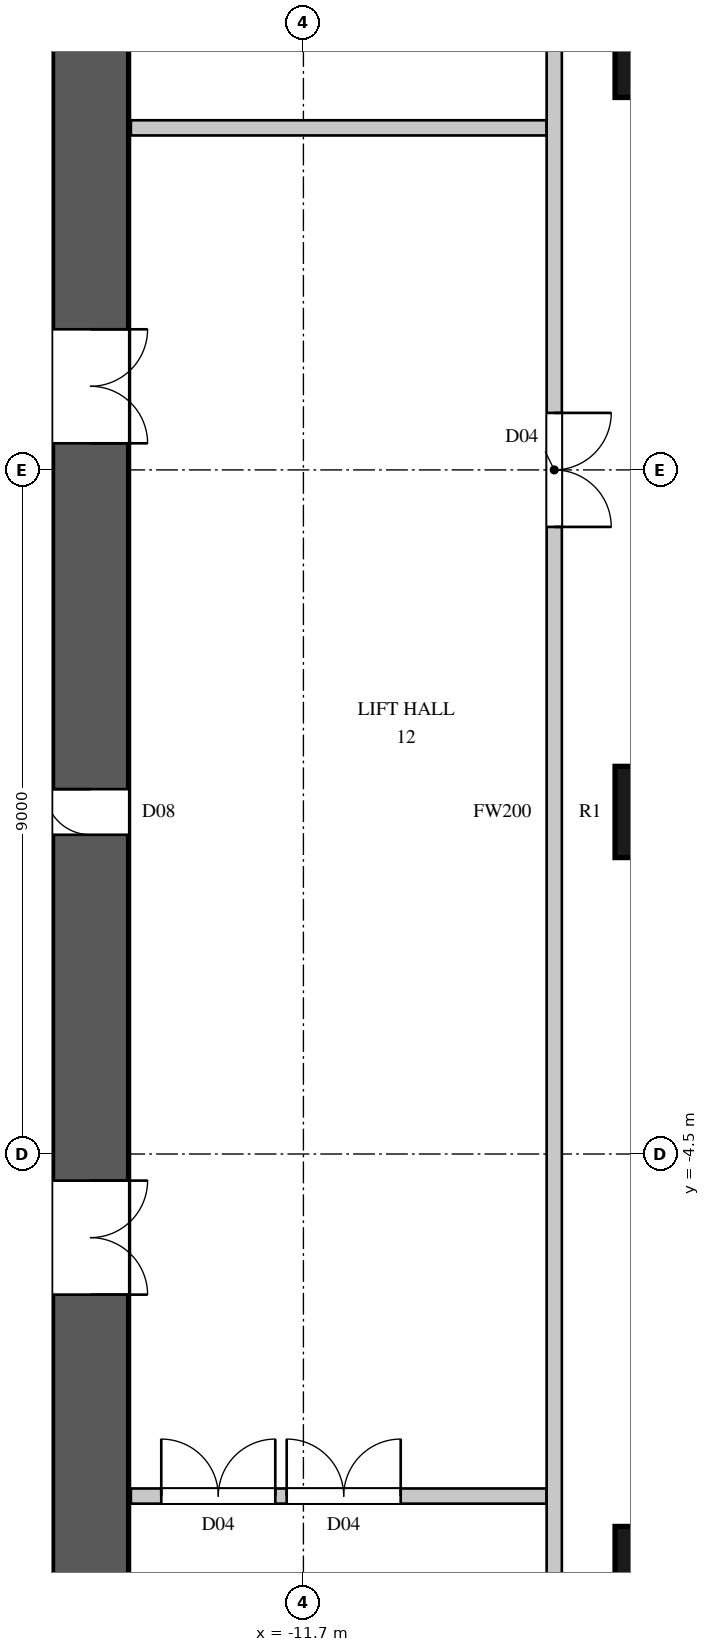
"""IFC4 building model, lengths in metres.
Left out: names, types, materials, properties, quantities, classifications, styles, units other than length and angle.
Written with IfcOpenShell. Run it as: python <this file> out.ifc"""

import sys

from ifc_helpers import new_model, si_unit, direction, frame, frame_2d, origin, origin_2d, place, context, subcontext, project, spatial, rectangle, circle, extrude, element, fill, save


model = new_model("IFC4")
c1 = context("Model", 3, precision=1e-05, world=origin(), true_north=direction((0.0, 1.0)))
c2 = subcontext(c1, "Body", "Model", "MODEL_VIEW")
j1 = project(units=[si_unit("LENGTHUNIT", "METRE"), si_unit("PLANEANGLEUNIT", "RADIAN")], contexts=[c1])
p1 = place(None, origin())
s1 = spatial("IfcSite", under=j1, at=p1, CompositionType="ELEMENT")
p2 = place(p1, origin())
s2 = spatial("IfcBuilding", under=s1, at=p2, CompositionType="ELEMENT")
p3 = place(p2, frame((0.0, 0.0, 73.5)))
s3 = spatial("IfcBuildingStorey", under=s2, at=p3, CompositionType="ELEMENT", Elevation=73.5)
for number, where, z_axis, x_axis in (
    (1, (-7.0, -10.0, 0.0), (0.0, 0.0, 1.0), (1.0, 0.0, 0.0)),
    (2, (-7.0, 0.0, 0.0), (0.0, 0.0, 1.0), (1.0, 0.0, 0.0)),
    (3, (-7.0, 10.0, 0.0), (0.0, 0.0, 1.0), (1.0, 0.0, 0.0)),
):
    element("IfcColumn", number, at=place(p3, frame(where, z_axis=z_axis, x_axis=x_axis)), inside=s3, PredefinedType="COLUMN", context=c2, shape_type="SweptSolid", body=[
        extrude(circle(Radius=0.6, at=origin_2d()), origin(), (0.0, 0.0, 1.0), 3.6),
    ])
p4 = place(p3, frame((-14.5, -14.8, 0.0), z_axis=(0.0, 0.0, 1.0), x_axis=(0.0, 1.0, 0.0)))
e4 = element("IfcWall", 4, at=p4, inside=s3, PredefinedType="SHEAR", context=c2, shape_type="SweptSolid", body=[
    extrude(rectangle(XDim=29.6, YDim=1.0, at=frame_2d((14.8, 0.0))), origin(), (0.0, 0.0, 1.0), 3.6),
])
p5 = place(p4, frame((8.45, 0.0, 0.0)))
e5 = element("IfcOpeningElement", 5, at=p5, cuts=e4, PredefinedType="OPENING", context=c2, shape_type="SweptSolid", body=[
    extrude(rectangle(XDim=1.5, YDim=2.4, at=frame_2d((0.75, 1.2))), frame((0.0, 0.51, 0.0), z_axis=(0.0, -1.0, 0.0), x_axis=(1.0, 0.0, 0.0)), (0.0, 0.0, 1.0), 1.02),
])
p6 = place(p4, frame((19.65, 0.0, 0.0)))
e6 = element("IfcOpeningElement", 6, at=p6, cuts=e4, PredefinedType="OPENING", context=c2, shape_type="SweptSolid", body=[
    extrude(rectangle(XDim=1.5, YDim=2.4, at=frame_2d((0.75, 1.2))), frame((0.0, 0.51, 0.0), z_axis=(0.0, -1.0, 0.0), x_axis=(1.0, 0.0, 0.0)), (0.0, 0.0, 1.0), 1.02),
])
p7 = place(p4, frame((14.5, 0.0, 0.0)))
e7 = element("IfcOpeningElement", 7, at=p7, cuts=e4, PredefinedType="OPENING", context=c2, shape_type="SweptSolid", body=[
    extrude(rectangle(XDim=0.6, YDim=2.0, at=frame_2d((0.3, 1.0))), frame((0.0, 0.51, 0.0), z_axis=(0.0, -1.0, 0.0), x_axis=(1.0, 0.0, 0.0)), (0.0, 0.0, 1.0), 1.02),
])
p8 = place(p3, frame((-13.97, -9.0, 0.0), z_axis=(0.0, 0.0, 1.0), x_axis=(1.0, 0.0, 0.0)))
e8 = element("IfcWall", 8, at=p8, inside=s3, PredefinedType="PARTITIONING", context=c2, shape_type="SweptSolid", body=[
    extrude(rectangle(XDim=5.47, YDim=0.2, at=frame_2d((2.735, 0.0))), origin(), (0.0, 0.0, 1.0), 3.3),
])
p9 = place(p8, frame((0.4, 0.0, 0.0)))
e9 = element("IfcOpeningElement", 9, at=p9, cuts=e8, PredefinedType="OPENING", context=c2, shape_type="SweptSolid", body=[
    extrude(rectangle(XDim=1.5, YDim=2.2, at=frame_2d((0.75, 1.1))), frame((0.0, 0.11, 0.0), z_axis=(0.0, -1.0, 0.0), x_axis=(1.0, 0.0, 0.0)), (0.0, 0.0, 1.0), 0.22),
])
p10 = place(p8, frame((2.05, 0.0, 0.0)))
e10 = element("IfcOpeningElement", 10, at=p10, cuts=e8, PredefinedType="OPENING", context=c2, shape_type="SweptSolid", body=[
    extrude(rectangle(XDim=1.5, YDim=2.2, at=frame_2d((0.75, 1.1))), frame((0.0, 0.11, 0.0), z_axis=(0.0, -1.0, 0.0), x_axis=(1.0, 0.0, 0.0)), (0.0, 0.0, 1.0), 0.22),
])
p11 = place(p3, frame((-13.97, 9.0, 0.0), z_axis=(0.0, 0.0, 1.0), x_axis=(1.0, 0.0, 0.0)))
e11 = element("IfcWall", 11, at=p11, inside=s3, PredefinedType="PARTITIONING", context=c2, shape_type="SweptSolid", body=[
    extrude(rectangle(XDim=5.47, YDim=0.2, at=frame_2d((2.735, 0.0))), origin(), (0.0, 0.0, 1.0), 3.3),
])
p12 = place(p3, frame((-8.4, -17.4, 0.0), z_axis=(0.0, 0.0, 1.0), x_axis=(0.0, 1.0, 0.0)))
e12 = element("IfcWall", 12, at=p12, inside=s3, PredefinedType="PARTITIONING", context=c2, shape_type="SweptSolid", body=[
    extrude(rectangle(XDim=34.8, YDim=0.2, at=frame_2d((17.4, 0.0))), origin(), (0.0, 0.0, 1.0), 3.3),
])
p13 = place(p12, frame((21.15, 0.0, 0.0)))
e13 = element("IfcOpeningElement", 13, at=p13, cuts=e12, PredefinedType="OPENING", context=c2, shape_type="SweptSolid", body=[
    extrude(rectangle(XDim=1.5, YDim=2.2, at=frame_2d((0.75, 1.1))), frame((0.0, 0.11, 0.0), z_axis=(0.0, -1.0, 0.0), x_axis=(1.0, 0.0, 0.0)), (0.0, 0.0, 1.0), 0.22),
])
p14 = place(p12, frame((33.75, 0.0, 0.0)))
e14 = element("IfcOpeningElement", 14, at=p14, cuts=e12, PredefinedType="OPENING", context=c2, shape_type="SweptSolid", body=[
    extrude(rectangle(XDim=0.9, YDim=2.2, at=frame_2d((0.45, 1.1))), frame((0.0, 0.11, 0.0), z_axis=(0.0, -1.0, 0.0), x_axis=(1.0, 0.0, 0.0)), (0.0, 0.0, 1.0), 0.22),
])
p15 = place(p12, frame((0.15, 0.0, 0.0)))
e15 = element("IfcOpeningElement", 15, at=p15, cuts=e12, PredefinedType="OPENING", context=c2, shape_type="SweptSolid", body=[
    extrude(rectangle(XDim=0.95, YDim=2.2, at=frame_2d((0.475, 1.1))), frame((0.0, 0.11, 0.0), z_axis=(0.0, -1.0, 0.0), x_axis=(1.0, 0.0, 0.0)), (0.0, 0.0, 1.0), 0.22),
])
p16 = place(p13, origin())
e16 = element("IfcDoor", 16, at=p16, inside=s3, OperationType="DOUBLE_DOOR_SINGLE_SWING", PredefinedType="DOOR", context=c2, shape_type="SweptSolid", body=[
    extrude(rectangle(XDim=1.5, YDim=2.2, at=frame_2d((0.75, 1.1))), frame((0.0, 0.025, 0.0), z_axis=(0.0, -1.0, 0.0), x_axis=(1.0, 0.0, 0.0)), (0.0, 0.0, 1.0), 0.05),
])
fill(e13, e16)
p17 = place(p9, origin())
e17 = element("IfcDoor", 17, at=p17, inside=s3, OperationType="DOUBLE_DOOR_SINGLE_SWING", PredefinedType="DOOR", context=c2, shape_type="SweptSolid", body=[
    extrude(rectangle(XDim=1.5, YDim=2.2, at=frame_2d((0.75, 1.1))), frame((0.0, 0.025, 0.0), z_axis=(0.0, -1.0, 0.0), x_axis=(1.0, 0.0, 0.0)), (0.0, 0.0, 1.0), 0.05),
])
fill(e9, e17)
p18 = place(p10, origin())
e18 = element("IfcDoor", 18, at=p18, inside=s3, OperationType="DOUBLE_DOOR_SINGLE_SWING", PredefinedType="DOOR", context=c2, shape_type="SweptSolid", body=[
    extrude(rectangle(XDim=1.5, YDim=2.2, at=frame_2d((0.75, 1.1))), frame((0.0, 0.025, 0.0), z_axis=(0.0, -1.0, 0.0), x_axis=(1.0, 0.0, 0.0)), (0.0, 0.0, 1.0), 0.05),
])
fill(e10, e18)
p19 = place(p5, origin())
e19 = element("IfcDoor", 19, at=p19, inside=s3, OperationType="DOUBLE_DOOR_SINGLE_SWING", PredefinedType="DOOR", context=c2, shape_type="SweptSolid", body=[
    extrude(rectangle(XDim=1.5, YDim=2.4, at=frame_2d((0.75, 1.2))), frame((0.0, -0.445, 0.0), z_axis=(0.0, -1.0, 0.0), x_axis=(1.0, 0.0, 0.0)), (0.0, 0.0, 1.0), 0.05),
])
fill(e5, e19)
p20 = place(p6, origin())
e20 = element("IfcDoor", 20, at=p20, inside=s3, OperationType="DOUBLE_DOOR_SINGLE_SWING", PredefinedType="DOOR", context=c2, shape_type="SweptSolid", body=[
    extrude(rectangle(XDim=1.5, YDim=2.4, at=frame_2d((0.75, 1.2))), frame((0.0, -0.445, 0.0), z_axis=(0.0, -1.0, 0.0), x_axis=(1.0, 0.0, 0.0)), (0.0, 0.0, 1.0), 0.05),
])
fill(e6, e20)
p21 = place(p7, origin())
e21 = element("IfcDoor", 21, at=p21, inside=s3, OperationType="SINGLE_SWING_RIGHT", PredefinedType="DOOR", context=c2, shape_type="SweptSolid", body=[
    extrude(rectangle(XDim=0.6, YDim=2.0, at=frame_2d((0.3, 1.0))), frame((0.0, 0.495, 0.0), z_axis=(0.0, -1.0, 0.0), x_axis=(1.0, 0.0, 0.0)), (0.0, 0.0, 1.0), 0.05),
])
fill(e7, e21)
save(model, sys.argv[1])
